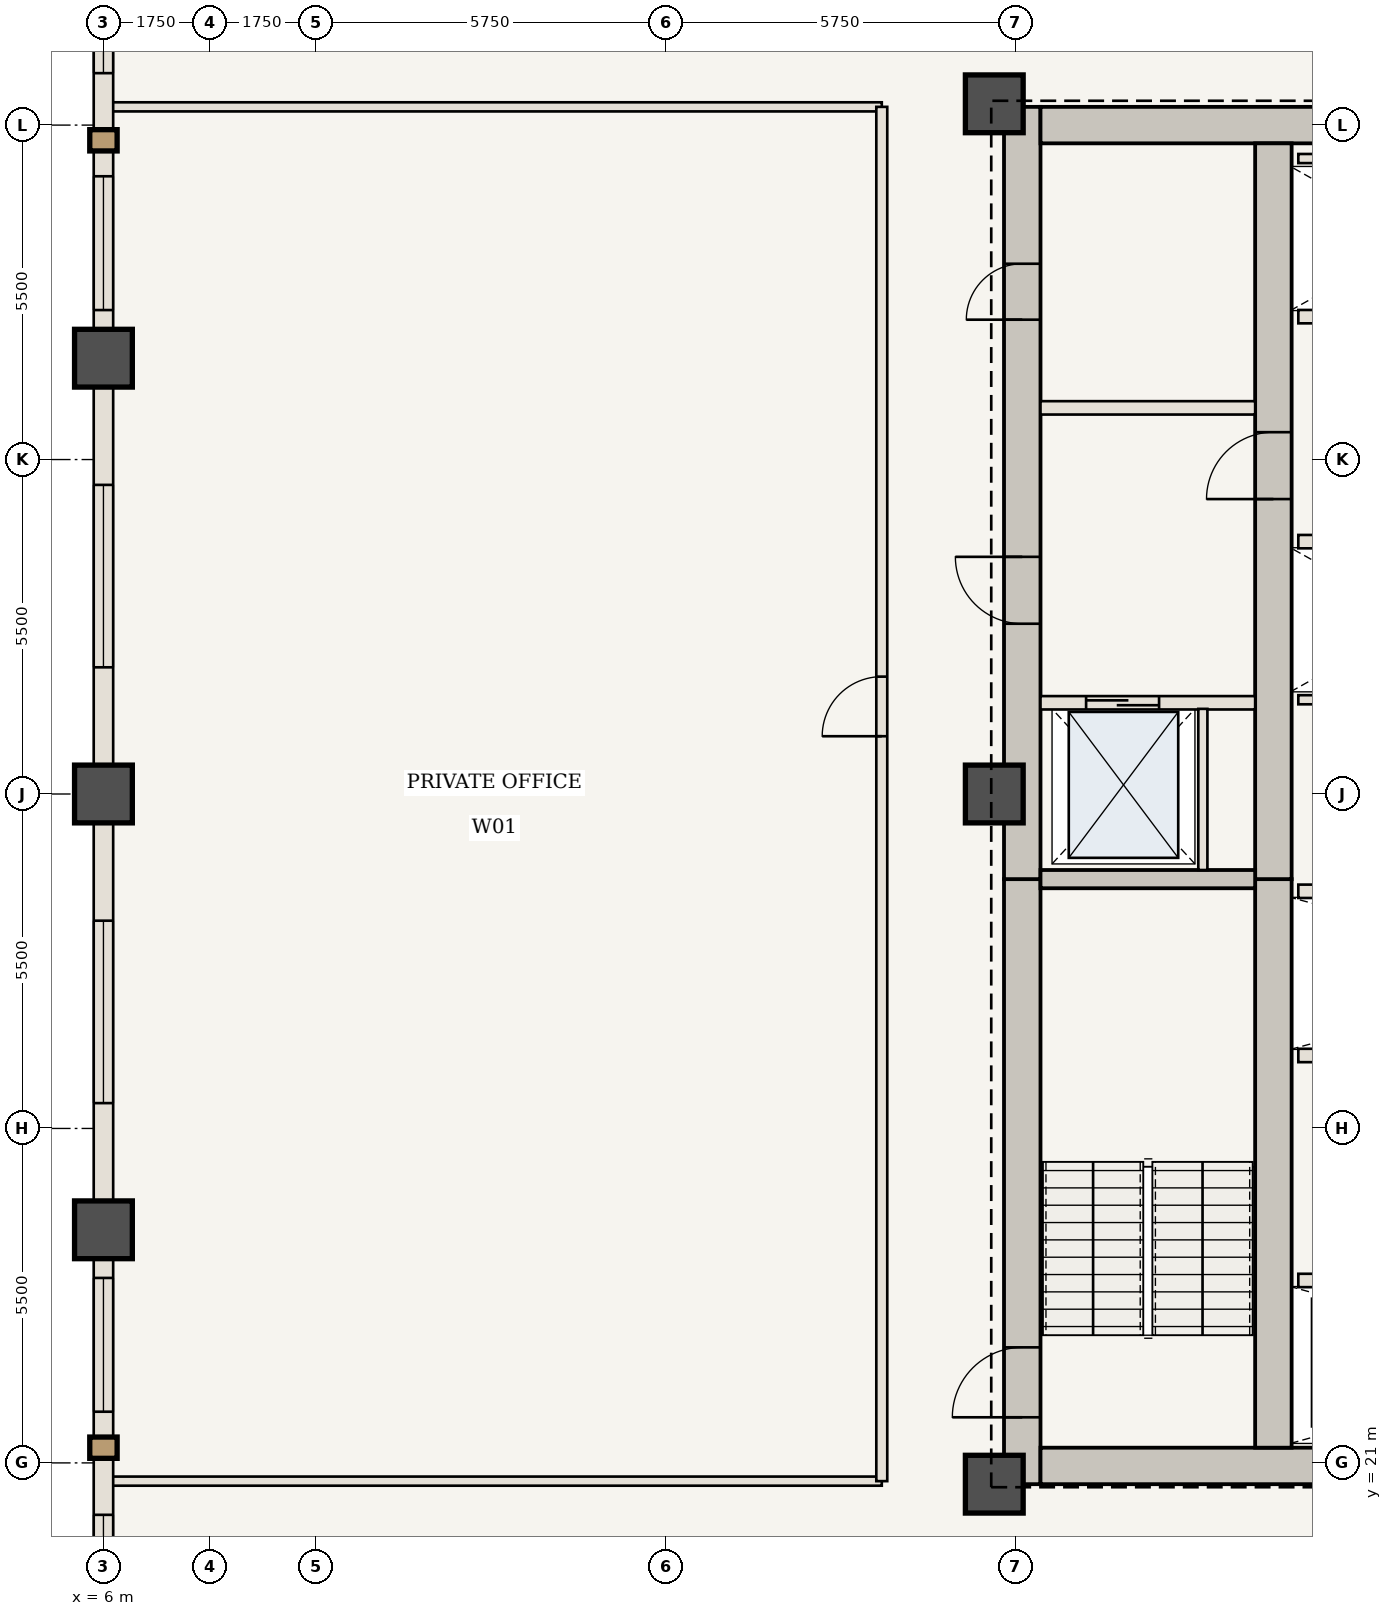
"""IFC4 building model, lengths in metres.
Left out: names, types, materials, properties, quantities, classifications, styles, units other than length and angle.
Written with IfcOpenShell. Run it as: python <this file> out.ifc"""

import sys

from ifc_helpers import new_model, si_unit, direction, frame, frame_2d, origin, origin_2d, place, context, subcontext, project, spatial, rectangle, extrude, element, fill, save


model = new_model("IFC4")
c1 = context("Model", 3, precision=1e-05, world=origin(), true_north=direction((0.0, 1.0)))
c2 = subcontext(c1, "Body", "Model", "MODEL_VIEW")
j1 = project(units=[si_unit("LENGTHUNIT", "METRE"), si_unit("PLANEANGLEUNIT", "RADIAN")], contexts=[c1])
p1 = place(None, origin())
s1 = spatial("IfcSite", under=j1, at=p1, CompositionType="ELEMENT")
p2 = place(p1, origin())
s2 = spatial("IfcBuilding", under=s1, at=p2, CompositionType="ELEMENT")
p3 = place(p2, frame((0.0, 0.0, 160.65)))
s3 = spatial("IfcBuildingStorey", under=s2, at=p3, CompositionType="ELEMENT", Elevation=160.65)
p4 = place(p3, frame((21.11, 20.65, 0.0), z_axis=(0.0, 0.0, 1.0), x_axis=(0.0, 1.0, 0.0)))
e1 = element("IfcWall", 1, at=p4, inside=s3, PredefinedType="SHEAR", context=c2, shape_type="SweptSolid", body=[
    extrude(rectangle(XDim=9.95, YDim=0.6, at=frame_2d((4.975, 0.0))), origin(), (0.0, 0.0, 1.0), 3.85),
])
p5 = place(p4, frame((1.1, 0.0, 0.0)))
e2 = element("IfcOpeningElement", 2, at=p5, cuts=e1, PredefinedType="OPENING", context=c2, shape_type="SweptSolid", body=[
    extrude(rectangle(XDim=1.15, YDim=2.15, at=frame_2d((0.575, 1.075))), frame((0.0, 0.31, 0.0), z_axis=(0.0, -1.0, 0.0), x_axis=(1.0, 0.0, 0.0)), (0.0, 0.0, 1.0), 0.62),
])
p6 = place(p3, frame((21.11, 30.6, 0.0), z_axis=(0.0, 0.0, 1.0), x_axis=(0.0, 1.0, 0.0)))
e3 = element("IfcWall", 3, at=p6, inside=s3, PredefinedType="SHEAR", context=c2, shape_type="SweptSolid", body=[
    extrude(rectangle(XDim=12.7, YDim=0.6, at=frame_2d((6.35, 0.0))), origin(), (0.0, 0.0, 1.0), 3.85),
])
p7 = place(p6, frame((4.2, 0.0, 0.0)))
e4 = element("IfcOpeningElement", 4, at=p7, cuts=e3, PredefinedType="OPENING", context=c2, shape_type="SweptSolid", body=[
    extrude(rectangle(XDim=1.1, YDim=2.15, at=frame_2d((0.55, 1.075))), frame((0.0, 0.31, 0.0), z_axis=(0.0, -1.0, 0.0), x_axis=(1.0, 0.0, 0.0)), (0.0, 0.0, 1.0), 0.62),
])
p8 = place(p6, frame((9.2, 0.0, 0.0)))
e5 = element("IfcOpeningElement", 5, at=p8, cuts=e3, PredefinedType="OPENING", context=c2, shape_type="SweptSolid", body=[
    extrude(rectangle(XDim=0.92, YDim=2.1, at=frame_2d((0.46, 1.05))), frame((0.0, 0.31, 0.0), z_axis=(0.0, -1.0, 0.0), x_axis=(1.0, 0.0, 0.0)), (0.0, 0.0, 1.0), 0.62),
])
p9 = place(p3, frame((21.41, 20.95, 0.0), z_axis=(0.0, 0.0, 1.0), x_axis=(1.0, 0.0, 0.0)))
e6 = element("IfcWall", 6, at=p9, inside=s3, PredefinedType="SHEAR", context=c2, shape_type="SweptSolid", body=[
    extrude(rectangle(XDim=13.74, YDim=0.6, at=frame_2d((6.87, 0.0))), origin(), (0.0, 0.0, 1.0), 3.85),
])
p10 = place(p3, frame((21.41, 43.0, 0.0), z_axis=(0.0, 0.0, 1.0), x_axis=(1.0, 0.0, 0.0)))
e7 = element("IfcWall", 7, at=p10, inside=s3, PredefinedType="SHEAR", context=c2, shape_type="SweptSolid", body=[
    extrude(rectangle(XDim=8.24, YDim=0.6, at=frame_2d((4.12, 0.0))), origin(), (0.0, 0.0, 1.0), 3.85),
])
p11 = place(p3, frame((25.24, 21.25, 0.0), z_axis=(0.0, 0.0, 1.0), x_axis=(0.0, 1.0, 0.0)))
e8 = element("IfcWall", 8, at=p11, inside=s3, PredefinedType="SHEAR", context=c2, shape_type="SweptSolid", body=[
    extrude(rectangle(XDim=9.35, YDim=0.6, at=frame_2d((4.675, 0.0))), origin(), (0.0, 0.0, 1.0), 3.85),
])
p12 = place(p3, frame((25.24, 30.6, 0.0), z_axis=(0.0, 0.0, 1.0), x_axis=(0.0, 1.0, 0.0)))
e9 = element("IfcWall", 9, at=p12, inside=s3, PredefinedType="SHEAR", context=c2, shape_type="SweptSolid", body=[
    extrude(rectangle(XDim=12.1, YDim=0.6, at=frame_2d((6.05, 0.0))), origin(), (0.0, 0.0, 1.0), 3.85),
])
p13 = place(p12, frame((6.25, 0.0, 0.0)))
e10 = element("IfcOpeningElement", 10, at=p13, cuts=e9, PredefinedType="OPENING", context=c2, shape_type="SweptSolid", body=[
    extrude(rectangle(XDim=1.1, YDim=2.15, at=frame_2d((0.55, 1.075))), frame((0.0, 0.31, 0.0), z_axis=(0.0, -1.0, 0.0), x_axis=(1.0, 0.0, 0.0)), (0.0, 0.0, 1.0), 0.62),
])
for number, where, z_axis, x_axis in (
    (11, (20.65, 20.65, 0.0), (0.0, 0.0, 1.0), (1.0, 0.0, 0.0)),
    (12, (20.65, 43.35, 0.0), (0.0, 0.0, 1.0), (1.0, 0.0, 0.0)),
    (13, (20.65, 32.0, 0.0), (0.0, 0.0, 1.0), (1.0, 0.0, 0.0)),
    (14, (6.0, 24.833, 0.0), (0.0, 0.0, 1.0), (1.0, 0.0, 0.0)),
    (15, (6.0, 32.0, 0.0), (0.0, 0.0, 1.0), (1.0, 0.0, 0.0)),
    (16, (6.0, 39.167, 0.0), (0.0, 0.0, 1.0), (1.0, 0.0, 0.0)),
):
    element("IfcColumn", number, at=place(p3, frame(where, z_axis=z_axis, x_axis=x_axis)), inside=s3, PredefinedType="COLUMN", context=c2, shape_type="SweptSolid", body=[
        extrude(rectangle(XDim=0.95, YDim=0.95, at=origin_2d()), origin(), (0.0, 0.0, 1.0), 3.85),
    ])
p14 = place(p3, frame((21.41, 30.6, 0.0), z_axis=(0.0, 0.0, 1.0), x_axis=(1.0, 0.0, 0.0)))
e17 = element("IfcWall", 17, at=p14, inside=s3, PredefinedType="SHEAR", context=c2, shape_type="SweptSolid", body=[
    extrude(rectangle(XDim=3.53, YDim=0.3, at=frame_2d((1.765, 0.0))), origin(), (0.0, 0.0, 1.0), 3.685),
])
p15 = place(p3, frame((21.41, 33.5, 0.0), z_axis=(0.0, 0.0, 1.0), x_axis=(1.0, 0.0, 0.0)))
e18 = element("IfcWall", 18, at=p15, inside=s3, PredefinedType="STANDARD", context=c2, shape_type="SweptSolid", body=[
    extrude(rectangle(XDim=3.53, YDim=0.22, at=frame_2d((1.765, 0.0))), origin(), (0.0, 0.0, 1.0), 3.685),
])
p16 = place(p15, frame((0.75, 0.0, 0.0)))
e19 = element("IfcOpeningElement", 19, at=p16, cuts=e18, PredefinedType="OPENING", context=c2, shape_type="SweptSolid", body=[
    extrude(rectangle(XDim=1.2, YDim=2.2, at=frame_2d((0.6, 1.1))), frame((0.0, 0.12, 0.0), z_axis=(0.0, -1.0, 0.0), x_axis=(1.0, 0.0, 0.0)), (0.0, 0.0, 1.0), 0.24),
])
p17 = place(p3, frame((24.08, 30.75, 0.0), z_axis=(0.0, 0.0, 1.0), x_axis=(0.0, 1.0, 0.0)))
e20 = element("IfcWall", 20, at=p17, inside=s3, PredefinedType="STANDARD", context=c2, shape_type="SweptSolid", body=[
    extrude(rectangle(XDim=2.65, YDim=0.15, at=frame_2d((1.325, 0.0))), origin(), (0.0, 0.0, 1.0), 3.685),
])
p18 = place(p3, frame((21.41, 38.35, 0.0), z_axis=(0.0, 0.0, 1.0), x_axis=(1.0, 0.0, 0.0)))
e21 = element("IfcWall", 21, at=p18, inside=s3, PredefinedType="STANDARD", context=c2, shape_type="SweptSolid", body=[
    extrude(rectangle(XDim=3.53, YDim=0.22, at=frame_2d((1.765, 0.0))), origin(), (0.0, 0.0, 1.0), 3.685),
])
p19 = place(p3, frame((25.65, 24.0, 0.0), z_axis=(0.0, 0.0, 1.0), x_axis=(1.0, 0.0, 0.0)))
e22 = element("IfcWall", 22, at=p19, inside=s3, PredefinedType="STANDARD", context=c2, shape_type="SweptSolid", body=[
    extrude(rectangle(XDim=9.25, YDim=0.22, at=frame_2d((4.625, 0.0))), origin(), (0.0, 0.0, 1.0), 3.685),
])
p20 = place(p19, frame((0.58, 0.0, 0.0)))
e23 = element("IfcOpeningElement", 23, at=p20, cuts=e22, PredefinedType="OPENING", context=c2, shape_type="SweptSolid", body=[
    extrude(rectangle(XDim=1.1, YDim=2.15, at=frame_2d((0.55, 1.075))), frame((0.0, 0.12, 0.0), z_axis=(0.0, -1.0, 0.0), x_axis=(1.0, 0.0, 0.0)), (0.0, 0.0, 1.0), 0.24),
])
p21 = place(p19, frame((2.75, 0.0, 0.0)))
e24 = element("IfcOpeningElement", 24, at=p21, cuts=e22, PredefinedType="OPENING", context=c2, shape_type="SweptSolid", body=[
    extrude(rectangle(XDim=1.1, YDim=2.15, at=frame_2d((0.55, 1.075))), frame((0.0, 0.12, 0.0), z_axis=(0.0, -1.0, 0.0), x_axis=(1.0, 0.0, 0.0)), (0.0, 0.0, 1.0), 0.24),
])
p22 = place(p19, frame((5.05, 0.0, 0.0)))
e25 = element("IfcOpeningElement", 25, at=p22, cuts=e22, PredefinedType="OPENING", context=c2, shape_type="SweptSolid", body=[
    extrude(rectangle(XDim=1.1, YDim=2.15, at=frame_2d((0.55, 1.075))), frame((0.0, 0.12, 0.0), z_axis=(0.0, -1.0, 0.0), x_axis=(1.0, 0.0, 0.0)), (0.0, 0.0, 1.0), 0.24),
])
p23 = place(p19, frame((7.35, 0.0, 0.0)))
e26 = element("IfcOpeningElement", 26, at=p23, cuts=e22, PredefinedType="OPENING", context=c2, shape_type="SweptSolid", body=[
    extrude(rectangle(XDim=1.1, YDim=2.15, at=frame_2d((0.55, 1.075))), frame((0.0, 0.12, 0.0), z_axis=(0.0, -1.0, 0.0), x_axis=(1.0, 0.0, 0.0)), (0.0, 0.0, 1.0), 0.24),
])
for number, where, z_axis, x_axis in (
    (27, (25.65, 27.7, 0.0), (0.0, 0.0, 1.0), (1.0, 0.0, 0.0)),
    (28, (25.65, 30.4, 0.0), (0.0, 0.0, 1.0), (1.0, 0.0, 0.0)),
):
    element("IfcWall", number, at=place(p3, frame(where, z_axis=z_axis, x_axis=x_axis)), inside=s3, PredefinedType="STANDARD", context=c2, shape_type="SweptSolid", body=[
        extrude(rectangle(XDim=9.25, YDim=0.22, at=frame_2d((4.625, 0.0))), origin(), (0.0, 0.0, 1.0), 3.685),
    ])
p24 = place(p3, frame((25.65, 36.15, 0.0), z_axis=(0.0, 0.0, 1.0), x_axis=(1.0, 0.0, 0.0)))
e29 = element("IfcWall", 29, at=p24, inside=s3, PredefinedType="STANDARD", context=c2, shape_type="SweptSolid", body=[
    extrude(rectangle(XDim=4.3, YDim=0.22, at=frame_2d((2.15, 0.0))), origin(), (0.0, 0.0, 1.0), 3.685),
])
p25 = place(p3, frame((25.65, 33.55, 0.0), z_axis=(0.0, 0.0, 1.0), x_axis=(1.0, 0.0, 0.0)))
e30 = element("IfcWall", 30, at=p25, inside=s3, PredefinedType="STANDARD", context=c2, shape_type="SweptSolid", body=[
    extrude(rectangle(XDim=4.2, YDim=0.15, at=frame_2d((2.1, 0.0))), origin(), (0.0, 0.0, 1.0), 3.685),
])
p26 = place(p3, frame((25.65, 39.85, 0.0), z_axis=(0.0, 0.0, 1.0), x_axis=(1.0, 0.0, 0.0)))
e31 = element("IfcWall", 31, at=p26, inside=s3, PredefinedType="STANDARD", context=c2, shape_type="SweptSolid", body=[
    extrude(rectangle(XDim=4.3, YDim=0.22, at=frame_2d((2.15, 0.0))), origin(), (0.0, 0.0, 1.0), 3.685),
])
p27 = place(p3, frame((25.65, 42.45, 0.0), z_axis=(0.0, 0.0, 1.0), x_axis=(1.0, 0.0, 0.0)))
e32 = element("IfcWall", 32, at=p27, inside=s3, PredefinedType="STANDARD", context=c2, shape_type="SweptSolid", body=[
    extrude(rectangle(XDim=4.2, YDim=0.15, at=frame_2d((2.1, 0.0))), origin(), (0.0, 0.0, 1.0), 3.685),
])
for number, where, z_axis, x_axis in (
    (33, (6.06, 20.7, 0.0), (0.0, 0.0, 1.0), (1.0, 0.0, 0.0)),
    (34, (6.06, 43.3, 0.0), (0.0, 0.0, 1.0), (1.0, 0.0, 0.0)),
):
    element("IfcWall", number, at=place(p3, frame(where, z_axis=z_axis, x_axis=x_axis)), inside=s3, PredefinedType="STANDARD", context=c2, shape_type="SweptSolid", body=[
        extrude(rectangle(XDim=12.74, YDim=0.15, at=frame_2d((6.37, 0.0))), origin(), (0.0, 0.0, 1.0), 3.065),
    ])
p28 = place(p3, frame((18.8, 20.7, 0.0), z_axis=(0.0, 0.0, 1.0), x_axis=(0.0, 1.0, 0.0)))
e35 = element("IfcWall", 35, at=p28, inside=s3, PredefinedType="STANDARD", context=c2, shape_type="SweptSolid", body=[
    extrude(rectangle(XDim=22.6, YDim=0.18, at=frame_2d((11.3, 0.0))), origin(), (0.0, 0.0, 1.0), 3.685),
])
p29 = place(p28, frame((12.25, 0.0, 0.0)))
e36 = element("IfcOpeningElement", 36, at=p29, cuts=e35, PredefinedType="OPENING", context=c2, shape_type="SweptSolid", body=[
    extrude(rectangle(XDim=0.98, YDim=2.2, at=frame_2d((0.49, 1.1))), frame((0.0, 0.1, 0.0), z_axis=(0.0, -1.0, 0.0), x_axis=(1.0, 0.0, 0.0)), (0.0, 0.0, 1.0), 0.2),
])
p30 = place(p3, frame((6.0, 17.667, 0.0), z_axis=(0.0, 0.0, 1.0), x_axis=(0.0, 1.0, 0.0)))
e37 = element("IfcWall", 37, at=p30, inside=s3, PredefinedType="USERDEFINED", context=c2, shape_type="SweptSolid", body=[
    extrude(rectangle(XDim=7.167, YDim=0.32, at=frame_2d((3.583, 0.0))), origin(), (0.0, 0.0, 1.0), 2.885),
])
p31 = place(p30, frame((0.879, 0.0, 0.85)))
e38 = element("IfcOpeningElement", 38, at=p31, cuts=e37, PredefinedType="OPENING", context=c2, shape_type="SweptSolid", body=[
    extrude(rectangle(XDim=1.6, YDim=1.835, at=frame_2d((0.8, 0.917))), frame((0.0, 0.17, 0.0), z_axis=(0.0, -1.0, 0.0), x_axis=(1.0, 0.0, 0.0)), (0.0, 0.0, 1.0), 0.34),
])
p32 = place(p30, frame((4.175, 0.0, 0.85)))
e39 = element("IfcOpeningElement", 39, at=p32, cuts=e37, PredefinedType="OPENING", context=c2, shape_type="SweptSolid", body=[
    extrude(rectangle(XDim=2.2, YDim=1.835, at=frame_2d((1.1, 0.917))), frame((0.0, 0.17, 0.0), z_axis=(0.0, -1.0, 0.0), x_axis=(1.0, 0.0, 0.0)), (0.0, 0.0, 1.0), 0.34),
])
p33 = place(p3, frame((6.0, 24.833, 0.0), z_axis=(0.0, 0.0, 1.0), x_axis=(0.0, 1.0, 0.0)))
e40 = element("IfcWall", 40, at=p33, inside=s3, PredefinedType="USERDEFINED", context=c2, shape_type="SweptSolid", body=[
    extrude(rectangle(XDim=7.167, YDim=0.32, at=frame_2d((3.583, 0.0))), origin(), (0.0, 0.0, 1.0), 2.885),
])
p34 = place(p33, frame((2.083, 0.0, 0.85)))
e41 = element("IfcOpeningElement", 41, at=p34, cuts=e40, PredefinedType="OPENING", context=c2, shape_type="SweptSolid", body=[
    extrude(rectangle(XDim=3.0, YDim=1.835, at=frame_2d((1.5, 0.917))), frame((0.0, 0.17, 0.0), z_axis=(0.0, -1.0, 0.0), x_axis=(1.0, 0.0, 0.0)), (0.0, 0.0, 1.0), 0.34),
])
p35 = place(p3, frame((6.0, 32.0, 0.0), z_axis=(0.0, 0.0, 1.0), x_axis=(0.0, 1.0, 0.0)))
e42 = element("IfcWall", 42, at=p35, inside=s3, PredefinedType="USERDEFINED", context=c2, shape_type="SweptSolid", body=[
    extrude(rectangle(XDim=7.167, YDim=0.32, at=frame_2d((3.583, 0.0))), origin(), (0.0, 0.0, 1.0), 2.885),
])
p36 = place(p35, frame((2.083, 0.0, 0.85)))
e43 = element("IfcOpeningElement", 43, at=p36, cuts=e42, PredefinedType="OPENING", context=c2, shape_type="SweptSolid", body=[
    extrude(rectangle(XDim=3.0, YDim=1.835, at=frame_2d((1.5, 0.917))), frame((0.0, 0.17, 0.0), z_axis=(0.0, -1.0, 0.0), x_axis=(1.0, 0.0, 0.0)), (0.0, 0.0, 1.0), 0.34),
])
p37 = place(p3, frame((6.0, 39.167, 0.0), z_axis=(0.0, 0.0, 1.0), x_axis=(0.0, 1.0, 0.0)))
e44 = element("IfcWall", 44, at=p37, inside=s3, PredefinedType="USERDEFINED", context=c2, shape_type="SweptSolid", body=[
    extrude(rectangle(XDim=7.167, YDim=0.32, at=frame_2d((3.583, 0.0))), origin(), (0.0, 0.0, 1.0), 2.885),
])
p38 = place(p37, frame((0.792, 0.0, 0.85)))
e45 = element("IfcOpeningElement", 45, at=p38, cuts=e44, PredefinedType="OPENING", context=c2, shape_type="SweptSolid", body=[
    extrude(rectangle(XDim=2.2, YDim=1.835, at=frame_2d((1.1, 0.917))), frame((0.0, 0.17, 0.0), z_axis=(0.0, -1.0, 0.0), x_axis=(1.0, 0.0, 0.0)), (0.0, 0.0, 1.0), 0.34),
])
p39 = place(p37, frame((4.688, 0.0, 0.85)))
e46 = element("IfcOpeningElement", 46, at=p39, cuts=e44, PredefinedType="OPENING", context=c2, shape_type="SweptSolid", body=[
    extrude(rectangle(XDim=1.6, YDim=1.835, at=frame_2d((0.8, 0.917))), frame((0.0, 0.17, 0.0), z_axis=(0.0, -1.0, 0.0), x_axis=(1.0, 0.0, 0.0)), (0.0, 0.0, 1.0), 0.34),
])
p40 = place(p5, origin())
e47 = element("IfcDoor", 47, at=p40, inside=s3, OperationType="SINGLE_SWING_LEFT", PredefinedType="DOOR", context=c2, shape_type="SweptSolid", body=[
    extrude(rectangle(XDim=1.15, YDim=2.15, at=frame_2d((0.575, 1.075))), frame((0.0, 0.025, 0.0), z_axis=(0.0, -1.0, 0.0), x_axis=(1.0, 0.0, 0.0)), (0.0, 0.0, 1.0), 0.05),
])
fill(e2, e47)
p41 = place(p7, origin())
e48 = element("IfcDoor", 48, at=p41, inside=s3, OperationType="SINGLE_SWING_RIGHT", PredefinedType="DOOR", context=c2, shape_type="SweptSolid", body=[
    extrude(rectangle(XDim=1.1, YDim=2.15, at=frame_2d((0.55, 1.075))), frame((0.0, 0.025, 0.0), z_axis=(0.0, -1.0, 0.0), x_axis=(1.0, 0.0, 0.0)), (0.0, 0.0, 1.0), 0.05),
])
fill(e4, e48)
p42 = place(p13, origin())
e49 = element("IfcDoor", 49, at=p42, inside=s3, OperationType="SINGLE_SWING_LEFT", PredefinedType="DOOR", context=c2, shape_type="SweptSolid", body=[
    extrude(rectangle(XDim=1.1, YDim=2.15, at=frame_2d((0.55, 1.075))), frame((0.0, 0.025, 0.0), z_axis=(0.0, -1.0, 0.0), x_axis=(1.0, 0.0, 0.0)), (0.0, 0.0, 1.0), 0.05),
])
fill(e10, e49)
p43 = place(p8, origin())
e50 = element("IfcDoor", 50, at=p43, inside=s3, OperationType="SINGLE_SWING_LEFT", PredefinedType="DOOR", context=c2, shape_type="SweptSolid", body=[
    extrude(rectangle(XDim=0.92, YDim=2.1, at=frame_2d((0.46, 1.05))), frame((0.0, 0.025, 0.0), z_axis=(0.0, -1.0, 0.0), x_axis=(1.0, 0.0, 0.0)), (0.0, 0.0, 1.0), 0.05),
])
fill(e5, e50)
p44 = place(p16, origin())
e51 = element("IfcDoor", 51, at=p44, inside=s3, OperationType="DOUBLE_DOOR_SLIDING", PredefinedType="DOOR", context=c2, shape_type="SweptSolid", body=[
    extrude(rectangle(XDim=1.2, YDim=2.2, at=frame_2d((0.6, 1.1))), frame((0.0, 0.025, 0.0), z_axis=(0.0, -1.0, 0.0), x_axis=(1.0, 0.0, 0.0)), (0.0, 0.0, 1.0), 0.05),
])
fill(e19, e51)
p45 = place(p29, origin())
e52 = element("IfcDoor", 52, at=p45, inside=s3, OperationType="SINGLE_SWING_LEFT", PredefinedType="DOOR", context=c2, shape_type="SweptSolid", body=[
    extrude(rectangle(XDim=0.98, YDim=2.2, at=frame_2d((0.49, 1.1))), frame((0.0, 0.025, 0.0), z_axis=(0.0, -1.0, 0.0), x_axis=(1.0, 0.0, 0.0)), (0.0, 0.0, 1.0), 0.05),
])
fill(e36, e52)
p46 = place(p31, origin())
e53 = element("IfcWindow", 53, at=p46, inside=s3, PartitioningType="SINGLE_PANEL", PredefinedType="WINDOW", context=c2, shape_type="SweptSolid", body=[
    extrude(rectangle(XDim=1.6, YDim=1.835, at=frame_2d((0.8, 0.917))), frame((0.0, 0.03, 0.0), z_axis=(0.0, -1.0, 0.0), x_axis=(1.0, 0.0, 0.0)), (0.0, 0.0, 1.0), 0.06),
])
fill(e38, e53)
p47 = place(p32, origin())
e54 = element("IfcWindow", 54, at=p47, inside=s3, PartitioningType="SINGLE_PANEL", PredefinedType="WINDOW", context=c2, shape_type="SweptSolid", body=[
    extrude(rectangle(XDim=2.2, YDim=1.835, at=frame_2d((1.1, 0.917))), frame((0.0, 0.03, 0.0), z_axis=(0.0, -1.0, 0.0), x_axis=(1.0, 0.0, 0.0)), (0.0, 0.0, 1.0), 0.06),
])
fill(e39, e54)
p48 = place(p34, origin())
e55 = element("IfcWindow", 55, at=p48, inside=s3, PartitioningType="SINGLE_PANEL", PredefinedType="WINDOW", context=c2, shape_type="SweptSolid", body=[
    extrude(rectangle(XDim=3.0, YDim=1.835, at=frame_2d((1.5, 0.917))), frame((0.0, 0.03, 0.0), z_axis=(0.0, -1.0, 0.0), x_axis=(1.0, 0.0, 0.0)), (0.0, 0.0, 1.0), 0.06),
])
fill(e41, e55)
p49 = place(p36, origin())
e56 = element("IfcWindow", 56, at=p49, inside=s3, PartitioningType="SINGLE_PANEL", PredefinedType="WINDOW", context=c2, shape_type="SweptSolid", body=[
    extrude(rectangle(XDim=3.0, YDim=1.835, at=frame_2d((1.5, 0.917))), frame((0.0, 0.03, 0.0), z_axis=(0.0, -1.0, 0.0), x_axis=(1.0, 0.0, 0.0)), (0.0, 0.0, 1.0), 0.06),
])
fill(e43, e56)
p50 = place(p38, origin())
e57 = element("IfcWindow", 57, at=p50, inside=s3, PartitioningType="SINGLE_PANEL", PredefinedType="WINDOW", context=c2, shape_type="SweptSolid", body=[
    extrude(rectangle(XDim=2.2, YDim=1.835, at=frame_2d((1.1, 0.917))), frame((0.0, 0.03, 0.0), z_axis=(0.0, -1.0, 0.0), x_axis=(1.0, 0.0, 0.0)), (0.0, 0.0, 1.0), 0.06),
])
fill(e45, e57)
p51 = place(p39, origin())
e58 = element("IfcWindow", 58, at=p51, inside=s3, PartitioningType="SINGLE_PANEL", PredefinedType="WINDOW", context=c2, shape_type="SweptSolid", body=[
    extrude(rectangle(XDim=1.6, YDim=1.835, at=frame_2d((0.8, 0.917))), frame((0.0, 0.03, 0.0), z_axis=(0.0, -1.0, 0.0), x_axis=(1.0, 0.0, 0.0)), (0.0, 0.0, 1.0), 0.06),
])
fill(e46, e58)
save(model, sys.argv[1])
